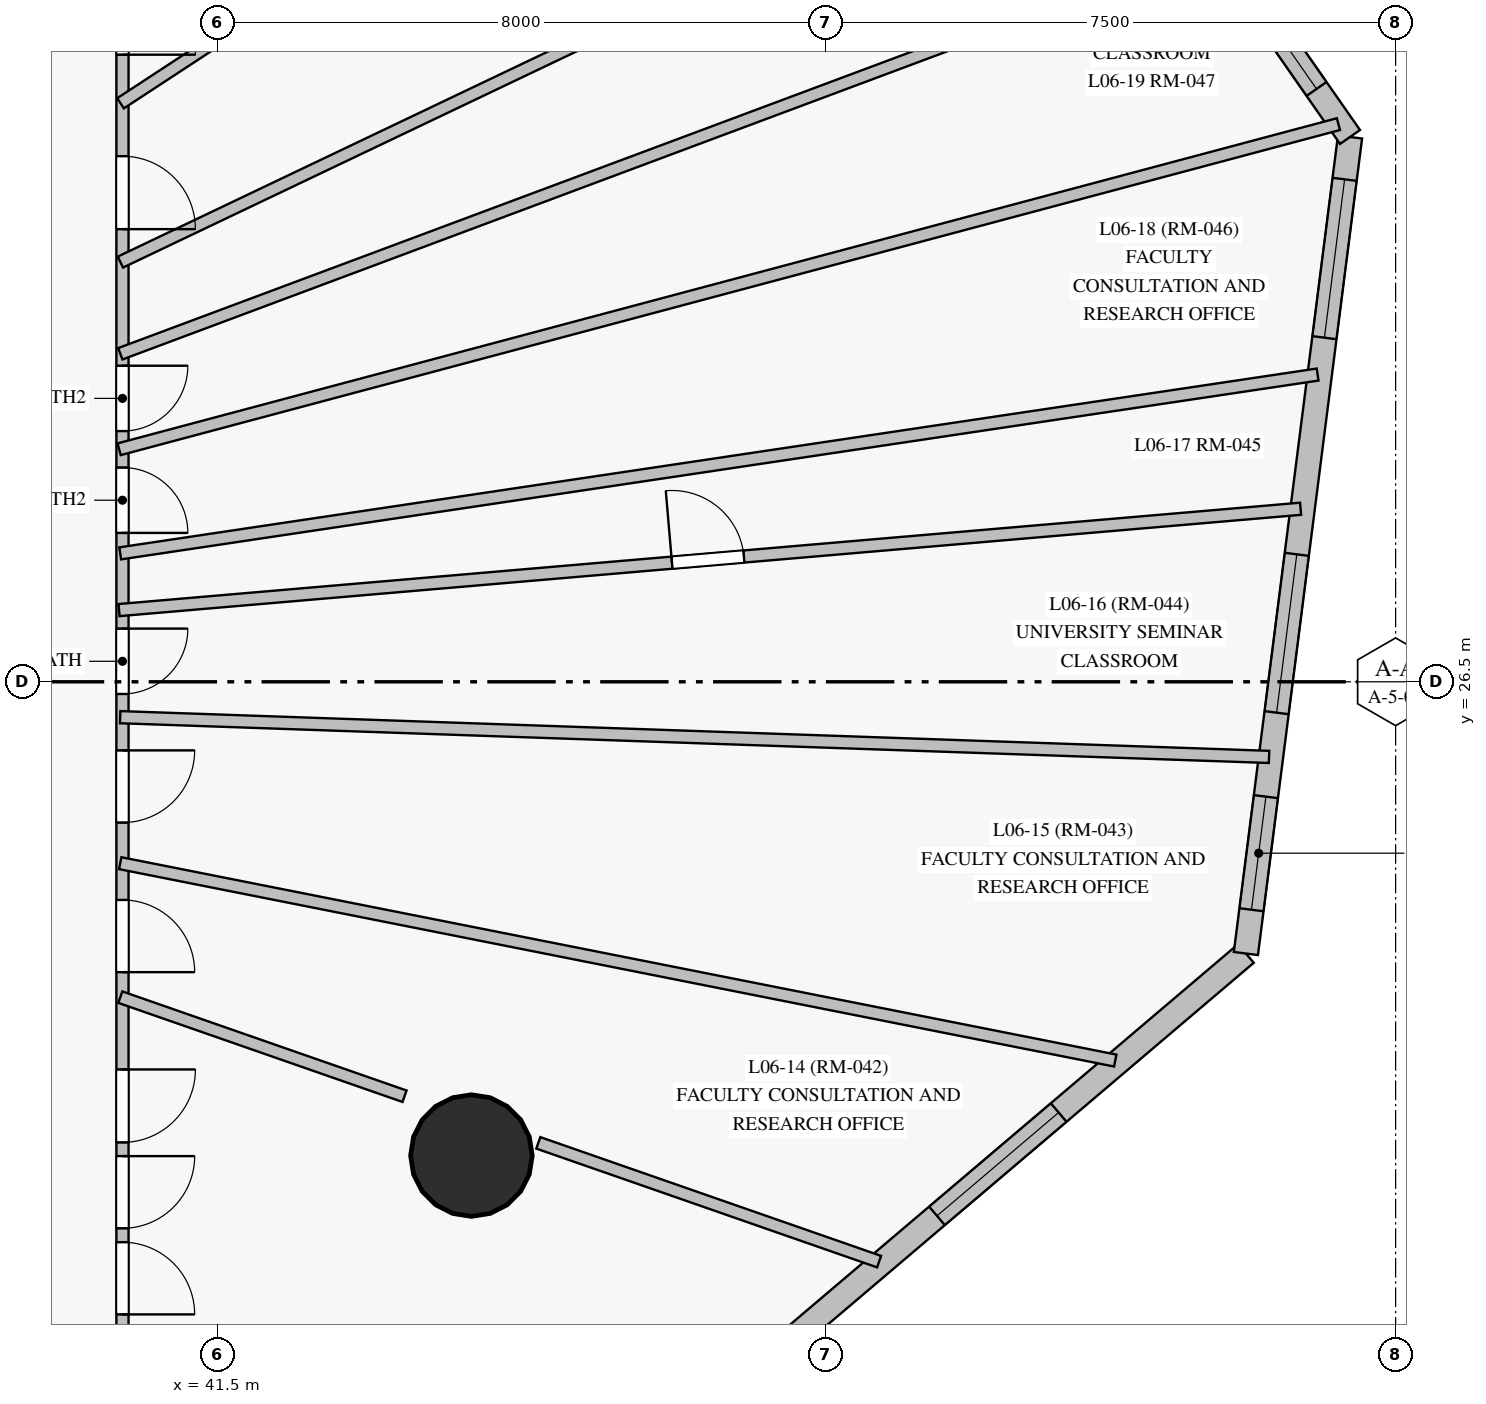
"""IFC4 building model, lengths in metres.
Left out: names, types, materials, properties, quantities, classifications, styles, units other than length and angle.
Written with IfcOpenShell. Run it as: python <this file> out.ifc"""

import sys

from ifc_helpers import new_model, si_unit, direction, frame, frame_2d, origin, origin_with_axes, origin_2d, place, context, subcontext, project, spatial, rectangle, circle, extrude, source, transform, mapped, element, fill, save


model = new_model("IFC4")
c1 = context("Model", 3, precision=1e-05, world=origin(), true_north=direction((0.0, 1.0)))
c2 = subcontext(c1, "Body", "Model", "MODEL_VIEW")
j1 = project(units=[si_unit("LENGTHUNIT", "METRE"), si_unit("PLANEANGLEUNIT", "RADIAN")], contexts=[c1])
p1 = place(None, origin())
s1 = spatial("IfcSite", under=j1, at=p1, CompositionType="ELEMENT")
p2 = place(p1, origin())
s2 = spatial("IfcBuilding", under=s1, at=p2, CompositionType="ELEMENT")
p3 = place(p2, frame((0.0, 0.0, 26.5)))
s3 = spatial("IfcBuildingStorey", under=s2, at=p3, CompositionType="ELEMENT", Elevation=26.5)
m1 = source(origin_with_axes(), c2, "Body", "SweptSolid", [
    extrude(circle(Radius=0.8, at=origin_2d()), origin(), (0.0, 0.0, 1.0), 3.6),
])
p4 = place(p3, frame((44.841, 20.267, 0.0), z_axis=(0.0, 0.0, 1.0), x_axis=(1.0, 0.0, 0.0)))
e1 = element("IfcColumn", 1, at=p4, inside=s3, PredefinedType="COLUMN", context=c2, shape_type="MappedRepresentation", body=[
    mapped(m1, transform((0.0, 0.0, 0.0), scale=1.0)),
])
p5 = place(p3, frame((42.624, 12.389, 0.0), z_axis=(0.0, 0.0, 1.0), x_axis=(0.762218671229, 0.647319625247, 0.0)))
e2 = element("IfcWall", 2, at=p5, inside=s3, PredefinedType="SOLIDWALL", context=c2, shape_type="SweptSolid", body=[
    extrude(rectangle(XDim=16.276, YDim=0.32, at=frame_2d((8.138, 0.0))), origin(), (0.0, 0.0, 1.0), 3.35),
])
p6 = place(p5, frame((0.601, 0.0, 0.85)))
e3 = element("IfcOpeningElement", 3, at=p6, cuts=e2, PredefinedType="OPENING", context=c2, shape_type="SweptSolid", body=[
    extrude(rectangle(XDim=1.8, YDim=1.85, at=frame_2d((0.9, 0.925))), frame((0.0, 0.17, 0.0), z_axis=(0.0, -1.0, 0.0), x_axis=(1.0, 0.0, 0.0)), (0.0, 0.0, 1.0), 0.34),
])
p7 = place(p5, frame((5.399, 0.0, 0.85)))
e4 = element("IfcOpeningElement", 4, at=p7, cuts=e2, PredefinedType="OPENING", context=c2, shape_type="SweptSolid", body=[
    extrude(rectangle(XDim=2.1, YDim=1.95, at=frame_2d((1.05, 0.975))), frame((0.0, 0.17, 0.0), z_axis=(0.0, -1.0, 0.0), x_axis=(1.0, 0.0, 0.0)), (0.0, 0.0, 1.0), 0.34),
])
p8 = place(p5, frame((10.945, 0.0, 0.85)))
e5 = element("IfcOpeningElement", 5, at=p8, cuts=e2, PredefinedType="OPENING", context=c2, shape_type="SweptSolid", body=[
    extrude(rectangle(XDim=2.1, YDim=1.95, at=frame_2d((1.05, 0.975))), frame((0.0, 0.17, 0.0), z_axis=(0.0, -1.0, 0.0), x_axis=(1.0, 0.0, 0.0)), (0.0, 0.0, 1.0), 0.34),
])
p9 = place(p3, frame((55.03, 22.925, 0.0), z_axis=(0.0, 0.0, 1.0), x_axis=(0.126495485641, 0.991967182982, 0.0)))
e6 = element("IfcWall", 6, at=p9, inside=s3, PredefinedType="SOLIDWALL", context=c2, shape_type="SweptSolid", body=[
    extrude(rectangle(XDim=10.829, YDim=0.32, at=frame_2d((5.415, 0.0))), origin(), (0.0, 0.0, 1.0), 3.35),
])
p10 = place(p9, frame((0.58, 0.0, 0.85)))
e7 = element("IfcOpeningElement", 7, at=p10, cuts=e6, PredefinedType="OPENING", context=c2, shape_type="SweptSolid", body=[
    extrude(rectangle(XDim=1.5, YDim=1.85, at=frame_2d((0.75, 0.925))), frame((0.0, 0.17, 0.0), z_axis=(0.0, -1.0, 0.0), x_axis=(1.0, 0.0, 0.0)), (0.0, 0.0, 1.0), 0.34),
])
p11 = place(p9, frame((3.194, 0.0, 0.85)))
e8 = element("IfcOpeningElement", 8, at=p11, cuts=e6, PredefinedType="OPENING", context=c2, shape_type="SweptSolid", body=[
    extrude(rectangle(XDim=2.1, YDim=1.95, at=frame_2d((1.05, 0.975))), frame((0.0, 0.17, 0.0), z_axis=(0.0, -1.0, 0.0), x_axis=(1.0, 0.0, 0.0)), (0.0, 0.0, 1.0), 0.34),
])
p12 = place(p9, frame((8.167, 0.0, 0.85)))
e9 = element("IfcOpeningElement", 9, at=p12, cuts=e6, PredefinedType="OPENING", context=c2, shape_type="SweptSolid", body=[
    extrude(rectangle(XDim=2.1, YDim=1.95, at=frame_2d((1.05, 0.975))), frame((0.0, 0.17, 0.0), z_axis=(0.0, -1.0, 0.0), x_axis=(1.0, 0.0, 0.0)), (0.0, 0.0, 1.0), 0.34),
])
p13 = place(p3, frame((56.4, 33.668, 0.0), z_axis=(0.0, 0.0, 1.0), x_axis=(-0.571842194633, 0.820363641586, 0.0)))
e10 = element("IfcWall", 10, at=p13, inside=s3, PredefinedType="SOLIDWALL", context=c2, shape_type="SweptSolid", body=[
    extrude(rectangle(XDim=13.47, YDim=0.32, at=frame_2d((6.735, 0.0))), origin(), (0.0, 0.0, 1.0), 3.35),
])
p14 = place(p13, frame((0.77, 0.0, 0.85)))
e11 = element("IfcOpeningElement", 11, at=p14, cuts=e10, PredefinedType="OPENING", context=c2, shape_type="SweptSolid", body=[
    extrude(rectangle(XDim=1.8, YDim=1.85, at=frame_2d((0.9, 0.925))), frame((0.0, 0.17, 0.0), z_axis=(0.0, -1.0, 0.0), x_axis=(1.0, 0.0, 0.0)), (0.0, 0.0, 1.0), 0.34),
])
p15 = place(p13, frame((3.581, 0.0, 0.85)))
e12 = element("IfcOpeningElement", 12, at=p15, cuts=e10, PredefinedType="OPENING", context=c2, shape_type="SweptSolid", body=[
    extrude(rectangle(XDim=1.5, YDim=1.85, at=frame_2d((0.75, 0.925))), frame((0.0, 0.17, 0.0), z_axis=(0.0, -1.0, 0.0), x_axis=(1.0, 0.0, 0.0)), (0.0, 0.0, 1.0), 0.34),
])
p16 = place(p13, frame((6.35, 0.0, 0.85)))
e13 = element("IfcOpeningElement", 13, at=p16, cuts=e10, PredefinedType="OPENING", context=c2, shape_type="SweptSolid", body=[
    extrude(rectangle(XDim=2.1, YDim=1.95, at=frame_2d((1.05, 0.975))), frame((0.0, 0.17, 0.0), z_axis=(0.0, -1.0, 0.0), x_axis=(1.0, 0.0, 0.0)), (0.0, 0.0, 1.0), 0.34),
])
p17 = place(p13, frame((9.816, 0.0, 0.85)))
e14 = element("IfcOpeningElement", 14, at=p17, cuts=e10, PredefinedType="OPENING", context=c2, shape_type="SweptSolid", body=[
    extrude(rectangle(XDim=1.8, YDim=1.85, at=frame_2d((0.9, 0.925))), frame((0.0, 0.17, 0.0), z_axis=(0.0, -1.0, 0.0), x_axis=(1.0, 0.0, 0.0)), (0.0, 0.0, 1.0), 0.34),
])
p18 = place(p3, frame((40.25, 37.65, 0.0), z_axis=(0.0, 0.0, 1.0), x_axis=(0.0, -1.0, 0.0)))
e15 = element("IfcWall", 15, at=p18, inside=s3, PredefinedType="PARTITIONING", context=c2, shape_type="SweptSolid", body=[
    extrude(rectangle(XDim=22.3, YDim=0.16, at=frame_2d((11.15, 0.0))), origin(), (0.0, 0.0, 1.0), 2.75),
])
p19 = place(p18, frame((16.25, 0.0, 0.0)))
e16 = element("IfcOpeningElement", 16, at=p19, cuts=e15, PredefinedType="OPENING", context=c2, shape_type="SweptSolid", body=[
    extrude(rectangle(XDim=0.96, YDim=2.15, at=frame_2d((0.48, 1.075))), frame((0.0, 0.09, 0.0), z_axis=(0.0, -1.0, 0.0), x_axis=(1.0, 0.0, 0.0)), (0.0, 0.0, 1.0), 0.18),
])
p20 = place(p18, frame((14.02, 0.0, 0.0)))
e17 = element("IfcOpeningElement", 17, at=p20, cuts=e15, PredefinedType="OPENING", context=c2, shape_type="SweptSolid", body=[
    extrude(rectangle(XDim=0.95, YDim=2.15, at=frame_2d((0.475, 1.075))), frame((0.0, 0.09, 0.0), z_axis=(0.0, -1.0, 0.0), x_axis=(1.0, 0.0, 0.0)), (0.0, 0.0, 1.0), 0.18),
])
p21 = place(p18, frame((12.052, 0.0, 0.0)))
e18 = element("IfcOpeningElement", 18, at=p21, cuts=e15, PredefinedType="OPENING", context=c2, shape_type="SweptSolid", body=[
    extrude(rectangle(XDim=0.95, YDim=2.15, at=frame_2d((0.475, 1.075))), frame((0.0, 0.09, 0.0), z_axis=(0.0, -1.0, 0.0), x_axis=(1.0, 0.0, 0.0)), (0.0, 0.0, 1.0), 0.18),
])
p22 = place(p18, frame((4.235, 0.0, 0.0)))
e19 = element("IfcOpeningElement", 19, at=p22, cuts=e15, PredefinedType="OPENING", context=c2, shape_type="SweptSolid", body=[
    extrude(rectangle(XDim=0.96, YDim=2.15, at=frame_2d((0.48, 1.075))), frame((0.0, 0.09, 0.0), z_axis=(0.0, -1.0, 0.0), x_axis=(1.0, 0.0, 0.0)), (0.0, 0.0, 1.0), 0.18),
])
p23 = place(p18, frame((10.45, 0.0, 0.0)))
e20 = element("IfcOpeningElement", 20, at=p23, cuts=e15, PredefinedType="OPENING", context=c2, shape_type="SweptSolid", body=[
    extrude(rectangle(XDim=0.86, YDim=2.1, at=frame_2d((0.43, 1.05))), frame((0.0, 0.09, 0.0), z_axis=(0.0, -1.0, 0.0), x_axis=(1.0, 0.0, 0.0)), (0.0, 0.0, 1.0), 0.18),
])
p24 = place(p18, frame((1.94, 0.0, 0.0)))
e21 = element("IfcOpeningElement", 21, at=p24, cuts=e15, PredefinedType="OPENING", context=c2, shape_type="SweptSolid", body=[
    extrude(rectangle(XDim=0.96, YDim=2.15, at=frame_2d((0.48, 1.075))), frame((0.0, 0.09, 0.0), z_axis=(0.0, -1.0, 0.0), x_axis=(1.0, 0.0, 0.0)), (0.0, 0.0, 1.0), 0.18),
])
p25 = place(p18, frame((17.39, 0.0, 0.0)))
e22 = element("IfcOpeningElement", 22, at=p25, cuts=e15, PredefinedType="OPENING", context=c2, shape_type="SweptSolid", body=[
    extrude(rectangle(XDim=0.95, YDim=2.15, at=frame_2d((0.475, 1.075))), frame((0.0, 0.09, 0.0), z_axis=(0.0, -1.0, 0.0), x_axis=(1.0, 0.0, 0.0)), (0.0, 0.0, 1.0), 0.18),
])
p26 = place(p18, frame((18.522, 0.0, 0.0)))
e23 = element("IfcOpeningElement", 23, at=p26, cuts=e15, PredefinedType="OPENING", context=c2, shape_type="SweptSolid", body=[
    extrude(rectangle(XDim=0.95, YDim=2.15, at=frame_2d((0.475, 1.075))), frame((0.0, 0.09, 0.0), z_axis=(0.0, -1.0, 0.0), x_axis=(1.0, 0.0, 0.0)), (0.0, 0.0, 1.0), 0.18),
])
p27 = place(p18, frame((8.331, 0.0, 0.0)))
e24 = element("IfcOpeningElement", 24, at=p27, cuts=e15, PredefinedType="OPENING", context=c2, shape_type="SweptSolid", body=[
    extrude(rectangle(XDim=0.86, YDim=2.04, at=frame_2d((0.43, 1.02))), frame((0.0, 0.09, 0.0), z_axis=(0.0, -1.0, 0.0), x_axis=(1.0, 0.0, 0.0)), (0.0, 0.0, 1.0), 0.18),
])
p28 = place(p18, frame((6.992, 0.0, 0.0)))
e25 = element("IfcOpeningElement", 25, at=p28, cuts=e15, PredefinedType="OPENING", context=c2, shape_type="SweptSolid", body=[
    extrude(rectangle(XDim=0.86, YDim=2.04, at=frame_2d((0.43, 1.02))), frame((0.0, 0.09, 0.0), z_axis=(0.0, -1.0, 0.0), x_axis=(1.0, 0.0, 0.0)), (0.0, 0.0, 1.0), 0.18),
])
p29 = place(p3, frame((40.207, 29.559, 0.0), z_axis=(0.0, 0.0, 1.0), x_axis=(0.966241529616, 0.257637936736, 0.0)))
e26 = element("IfcWall", 26, at=p29, inside=s3, PredefinedType="PARTITIONING", context=c2, shape_type="SweptSolid", body=[
    extrude(rectangle(XDim=16.601, YDim=0.16, at=frame_2d((8.301, 0.0))), origin(), (0.0, 0.0, 1.0), 3.35),
])
p30 = place(p3, frame((40.22, 28.189, 0.0), z_axis=(0.0, 0.0, 1.0), x_axis=(0.989032606849, 0.147697334402, 0.0)))
e27 = element("IfcWall", 27, at=p30, inside=s3, PredefinedType="PARTITIONING", context=c2, shape_type="SweptSolid", body=[
    extrude(rectangle(XDim=15.928, YDim=0.16, at=frame_2d((7.964, 0.0))), origin(), (0.0, 0.0, 1.0), 3.35),
])
p31 = place(p3, frame((40.205, 27.443, 0.0), z_axis=(0.0, 0.0, 1.0), x_axis=(0.996343224328, 0.08544108693, 0.0)))
e28 = element("IfcWall", 28, at=p31, inside=s3, PredefinedType="PARTITIONING", context=c2, shape_type="SweptSolid", body=[
    extrude(rectangle(XDim=15.602, YDim=0.16, at=frame_2d((7.801, 0.0))), origin(), (0.0, 0.0, 1.0), 3.35),
])
p32 = place(p31, frame((7.301, 0.0, 0.0)))
e29 = element("IfcOpeningElement", 29, at=p32, cuts=e28, PredefinedType="OPENING", context=c2, shape_type="SweptSolid", body=[
    extrude(rectangle(XDim=0.95, YDim=2.15, at=frame_2d((0.475, 1.075))), frame((0.0, 0.09, 0.0), z_axis=(0.0, -1.0, 0.0), x_axis=(1.0, 0.0, 0.0)), (0.0, 0.0, 1.0), 0.18),
])
p33 = place(p3, frame((40.222, 30.815, 0.0), z_axis=(0.0, 0.0, 1.0), x_axis=(0.936757036067, 0.349980364276, 0.0)))
e30 = element("IfcWall", 30, at=p33, inside=s3, PredefinedType="PARTITIONING", context=c2, shape_type="SweptSolid", body=[
    extrude(rectangle(XDim=15.358, YDim=0.16, at=frame_2d((7.679, 0.0))), origin(), (0.0, 0.0, 1.0), 3.35),
])
p34 = place(p3, frame((40.22, 26.034, 0.0), z_axis=(0.0, 0.0, 1.0), x_axis=(0.999402543326, -0.034562355155, 0.0)))
e31 = element("IfcWall", 31, at=p34, inside=s3, PredefinedType="PARTITIONING", context=c2, shape_type="SweptSolid", body=[
    extrude(rectangle(XDim=15.124, YDim=0.16, at=frame_2d((7.562, 0.0))), origin(), (0.0, 0.0, 1.0), 3.35),
])
p35 = place(p3, frame((40.223, 32.021, 0.0), z_axis=(0.0, 0.0, 1.0), x_axis=(0.902690033132, 0.430291417629, 0.0)))
e32 = element("IfcWall", 32, at=p35, inside=s3, PredefinedType="PARTITIONING", context=c2, shape_type="SweptSolid", body=[
    extrude(rectangle(XDim=14.379, YDim=0.16, at=frame_2d((7.189, 0.0))), origin(), (0.0, 0.0, 1.0), 3.35),
])
p36 = place(p35, frame((6.76, 0.0, 0.0)))
e33 = element("IfcOpeningElement", 33, at=p36, cuts=e32, PredefinedType="OPENING", context=c2, shape_type="SweptSolid", body=[
    extrude(rectangle(XDim=0.86, YDim=2.04, at=frame_2d((0.43, 1.02))), frame((0.0, 0.09, 0.0), z_axis=(0.0, -1.0, 0.0), x_axis=(1.0, 0.0, 0.0)), (0.0, 0.0, 1.0), 0.18),
])
p37 = place(p3, frame((40.221, 24.114, 0.0), z_axis=(0.0, 0.0, 1.0), x_axis=(0.980888341072, -0.194571483908, 0.0)))
e34 = element("IfcWall", 34, at=p37, inside=s3, PredefinedType="PARTITIONING", context=c2, shape_type="SweptSolid", body=[
    extrude(rectangle(XDim=13.346, YDim=0.16, at=frame_2d((6.673, 0.0))), origin(), (0.0, 0.0, 1.0), 3.35),
])
p38 = place(p3, frame((40.225, 34.111, 0.0), z_axis=(0.0, 0.0, 1.0), x_axis=(0.836442719116, 0.548054356463, 0.0)))
e35 = element("IfcWall", 35, at=p38, inside=s3, PredefinedType="PARTITIONING", context=c2, shape_type="SweptSolid", body=[
    extrude(rectangle(XDim=12.997, YDim=0.16, at=frame_2d((6.498, 0.0))), origin(), (0.0, 0.0, 1.0), 3.35),
])
p39 = place(p3, frame((45.721, 20.434, 0.0), z_axis=(0.0, 0.0, 1.0), x_axis=(0.944286423724, -0.329124824299, 0.0)))
e36 = element("IfcWall", 36, at=p39, inside=s3, PredefinedType="PARTITIONING", context=c2, shape_type="SweptSolid", body=[
    extrude(rectangle(XDim=4.748, YDim=0.16, at=frame_2d((2.374, 0.0))), origin(), (0.0, 0.0, 1.0), 3.35),
])
p40 = place(p3, frame((40.222, 22.351, 0.0), z_axis=(0.0, 0.0, 1.0), x_axis=(0.944292001394, -0.329108821066, 0.0)))
e37 = element("IfcWall", 37, at=p40, inside=s3, PredefinedType="PARTITIONING", context=c2, shape_type="SweptSolid", body=[
    extrude(rectangle(XDim=3.96, YDim=0.16, at=frame_2d((1.98, 0.0))), origin(), (0.0, 0.0, 1.0), 3.35),
])
m2 = source(origin_with_axes(), c2, "Body", "SweptSolid", [
    extrude(rectangle(XDim=2.1, YDim=1.95, at=frame_2d((1.05, 0.975))), frame((0.0, 0.03, 0.0), z_axis=(0.0, -1.0, 0.0), x_axis=(1.0, 0.0, 0.0)), (0.0, 0.0, 1.0), 0.06),
])
p41 = place(p8, origin())
e38 = element("IfcWindow", 38, at=p41, inside=s3, PartitioningType="SINGLE_PANEL", PredefinedType="WINDOW", context=c2, shape_type="MappedRepresentation", body=[
    mapped(m2, transform((0.0, 0.0, 0.0), scale=1.0)),
])
fill(e5, e38)
m3 = source(origin_with_axes(), c2, "Body", "SweptSolid", [
    extrude(rectangle(XDim=1.5, YDim=1.85, at=frame_2d((0.75, 0.925))), frame((0.0, 0.03, 0.0), z_axis=(0.0, -1.0, 0.0), x_axis=(1.0, 0.0, 0.0)), (0.0, 0.0, 1.0), 0.06),
])
p42 = place(p10, origin())
e39 = element("IfcWindow", 39, at=p42, inside=s3, PartitioningType="SINGLE_PANEL", PredefinedType="WINDOW", context=c2, shape_type="MappedRepresentation", body=[
    mapped(m3, transform((0.0, 0.0, 0.0), scale=1.0)),
])
fill(e7, e39)
p43 = place(p11, origin())
e40 = element("IfcWindow", 40, at=p43, inside=s3, PartitioningType="SINGLE_PANEL", PredefinedType="WINDOW", context=c2, shape_type="MappedRepresentation", body=[
    mapped(m2, transform((0.0, 0.0, 0.0), scale=1.0)),
])
fill(e8, e40)
p44 = place(p12, origin())
e41 = element("IfcWindow", 41, at=p44, inside=s3, PartitioningType="SINGLE_PANEL", PredefinedType="WINDOW", context=c2, shape_type="MappedRepresentation", body=[
    mapped(m2, transform((0.0, 0.0, 0.0), scale=1.0)),
])
fill(e9, e41)
m4 = source(origin_with_axes(), c2, "Body", "SweptSolid", [
    extrude(rectangle(XDim=1.8, YDim=1.85, at=frame_2d((0.9, 0.925))), frame((0.0, 0.03, 0.0), z_axis=(0.0, -1.0, 0.0), x_axis=(1.0, 0.0, 0.0)), (0.0, 0.0, 1.0), 0.06),
])
p45 = place(p14, origin())
e42 = element("IfcWindow", 42, at=p45, inside=s3, PartitioningType="SINGLE_PANEL", PredefinedType="WINDOW", context=c2, shape_type="MappedRepresentation", body=[
    mapped(m4, transform((0.0, 0.0, 0.0), scale=1.0)),
])
fill(e11, e42)
m5 = source(origin_with_axes(), c2, "Body", "SweptSolid", [
    extrude(rectangle(XDim=0.96, YDim=2.15, at=frame_2d((0.48, 1.075))), frame((0.0, 0.025, 0.0), z_axis=(0.0, -1.0, 0.0), x_axis=(1.0, 0.0, 0.0)), (0.0, 0.0, 1.0), 0.05),
])
p46 = place(p19, origin())
e43 = element("IfcDoor", 43, at=p46, inside=s3, OperationType="SINGLE_SWING_LEFT", PredefinedType="DOOR", context=c2, shape_type="MappedRepresentation", body=[
    mapped(m5, transform((0.0, 0.0, 0.0), scale=1.0)),
])
fill(e16, e43)
m6 = source(origin_with_axes(), c2, "Body", "SweptSolid", [
    extrude(rectangle(XDim=0.95, YDim=2.15, at=frame_2d((0.475, 1.075))), frame((0.0, 0.025, 0.0), z_axis=(0.0, -1.0, 0.0), x_axis=(1.0, 0.0, 0.0)), (0.0, 0.0, 1.0), 0.05),
])
p47 = place(p20, origin())
e44 = element("IfcDoor", 44, at=p47, inside=s3, OperationType="SINGLE_SWING_RIGHT", PredefinedType="DOOR", context=c2, shape_type="MappedRepresentation", body=[
    mapped(m6, transform((0.0, 0.0, 0.0), scale=1.0)),
])
fill(e17, e44)
p48 = place(p21, origin())
e45 = element("IfcDoor", 45, at=p48, inside=s3, OperationType="SINGLE_SWING_LEFT", PredefinedType="DOOR", context=c2, shape_type="MappedRepresentation", body=[
    mapped(m6, transform((0.0, 0.0, 0.0), scale=1.0)),
])
fill(e18, e45)
p49 = place(p22, origin())
e46 = element("IfcDoor", 46, at=p49, inside=s3, OperationType="SINGLE_SWING_RIGHT", PredefinedType="DOOR", context=c2, shape_type="MappedRepresentation", body=[
    mapped(m5, transform((0.0, 0.0, 0.0), scale=1.0)),
])
fill(e19, e46)
m7 = source(origin_with_axes(), c2, "Body", "SweptSolid", [
    extrude(rectangle(XDim=0.86, YDim=2.1, at=frame_2d((0.43, 1.05))), frame((0.0, 0.025, 0.0), z_axis=(0.0, -1.0, 0.0), x_axis=(1.0, 0.0, 0.0)), (0.0, 0.0, 1.0), 0.05),
])
p50 = place(p23, origin())
e47 = element("IfcDoor", 47, at=p50, inside=s3, OperationType="SINGLE_SWING_LEFT", PredefinedType="DOOR", context=c2, shape_type="MappedRepresentation", body=[
    mapped(m7, transform((0.0, 0.0, 0.0), scale=1.0)),
])
fill(e20, e47)
p51 = place(p24, origin())
e48 = element("IfcDoor", 48, at=p51, inside=s3, OperationType="SINGLE_SWING_RIGHT", PredefinedType="DOOR", context=c2, shape_type="MappedRepresentation", body=[
    mapped(m5, transform((0.0, 0.0, 0.0), scale=1.0)),
])
fill(e21, e48)
p52 = place(p25, origin())
e49 = element("IfcDoor", 49, at=p52, inside=s3, OperationType="SINGLE_SWING_LEFT", PredefinedType="DOOR", context=c2, shape_type="MappedRepresentation", body=[
    mapped(m6, transform((0.0, 0.0, 0.0), scale=1.0)),
])
fill(e22, e49)
p53 = place(p26, origin())
e50 = element("IfcDoor", 50, at=p53, inside=s3, OperationType="SINGLE_SWING_RIGHT", PredefinedType="DOOR", context=c2, shape_type="MappedRepresentation", body=[
    mapped(m6, transform((0.0, 0.0, 0.0), scale=1.0)),
])
fill(e23, e50)
p54 = place(p32, origin())
e51 = element("IfcDoor", 51, at=p54, inside=s3, OperationType="SINGLE_SWING_LEFT", PredefinedType="DOOR", context=c2, shape_type="MappedRepresentation", body=[
    mapped(m6, transform((0.0, 0.0, 0.0), scale=1.0)),
])
fill(e29, e51)
m8 = source(origin_with_axes(), c2, "Body", "SweptSolid", [
    extrude(rectangle(XDim=0.86, YDim=2.04, at=frame_2d((0.43, 1.02))), frame((0.0, 0.025, 0.0), z_axis=(0.0, -1.0, 0.0), x_axis=(1.0, 0.0, 0.0)), (0.0, 0.0, 1.0), 0.05),
])
p55 = place(p27, origin())
e52 = element("IfcDoor", 52, at=p55, inside=s3, OperationType="SINGLE_SWING_RIGHT", PredefinedType="DOOR", context=c2, shape_type="MappedRepresentation", body=[
    mapped(m8, transform((0.0, 0.0, 0.0), scale=1.0)),
])
fill(e24, e52)
p56 = place(p28, origin())
e53 = element("IfcDoor", 53, at=p56, inside=s3, OperationType="SINGLE_SWING_LEFT", PredefinedType="DOOR", context=c2, shape_type="MappedRepresentation", body=[
    mapped(m8, transform((0.0, 0.0, 0.0), scale=1.0)),
])
fill(e25, e53)
save(model, sys.argv[1])
